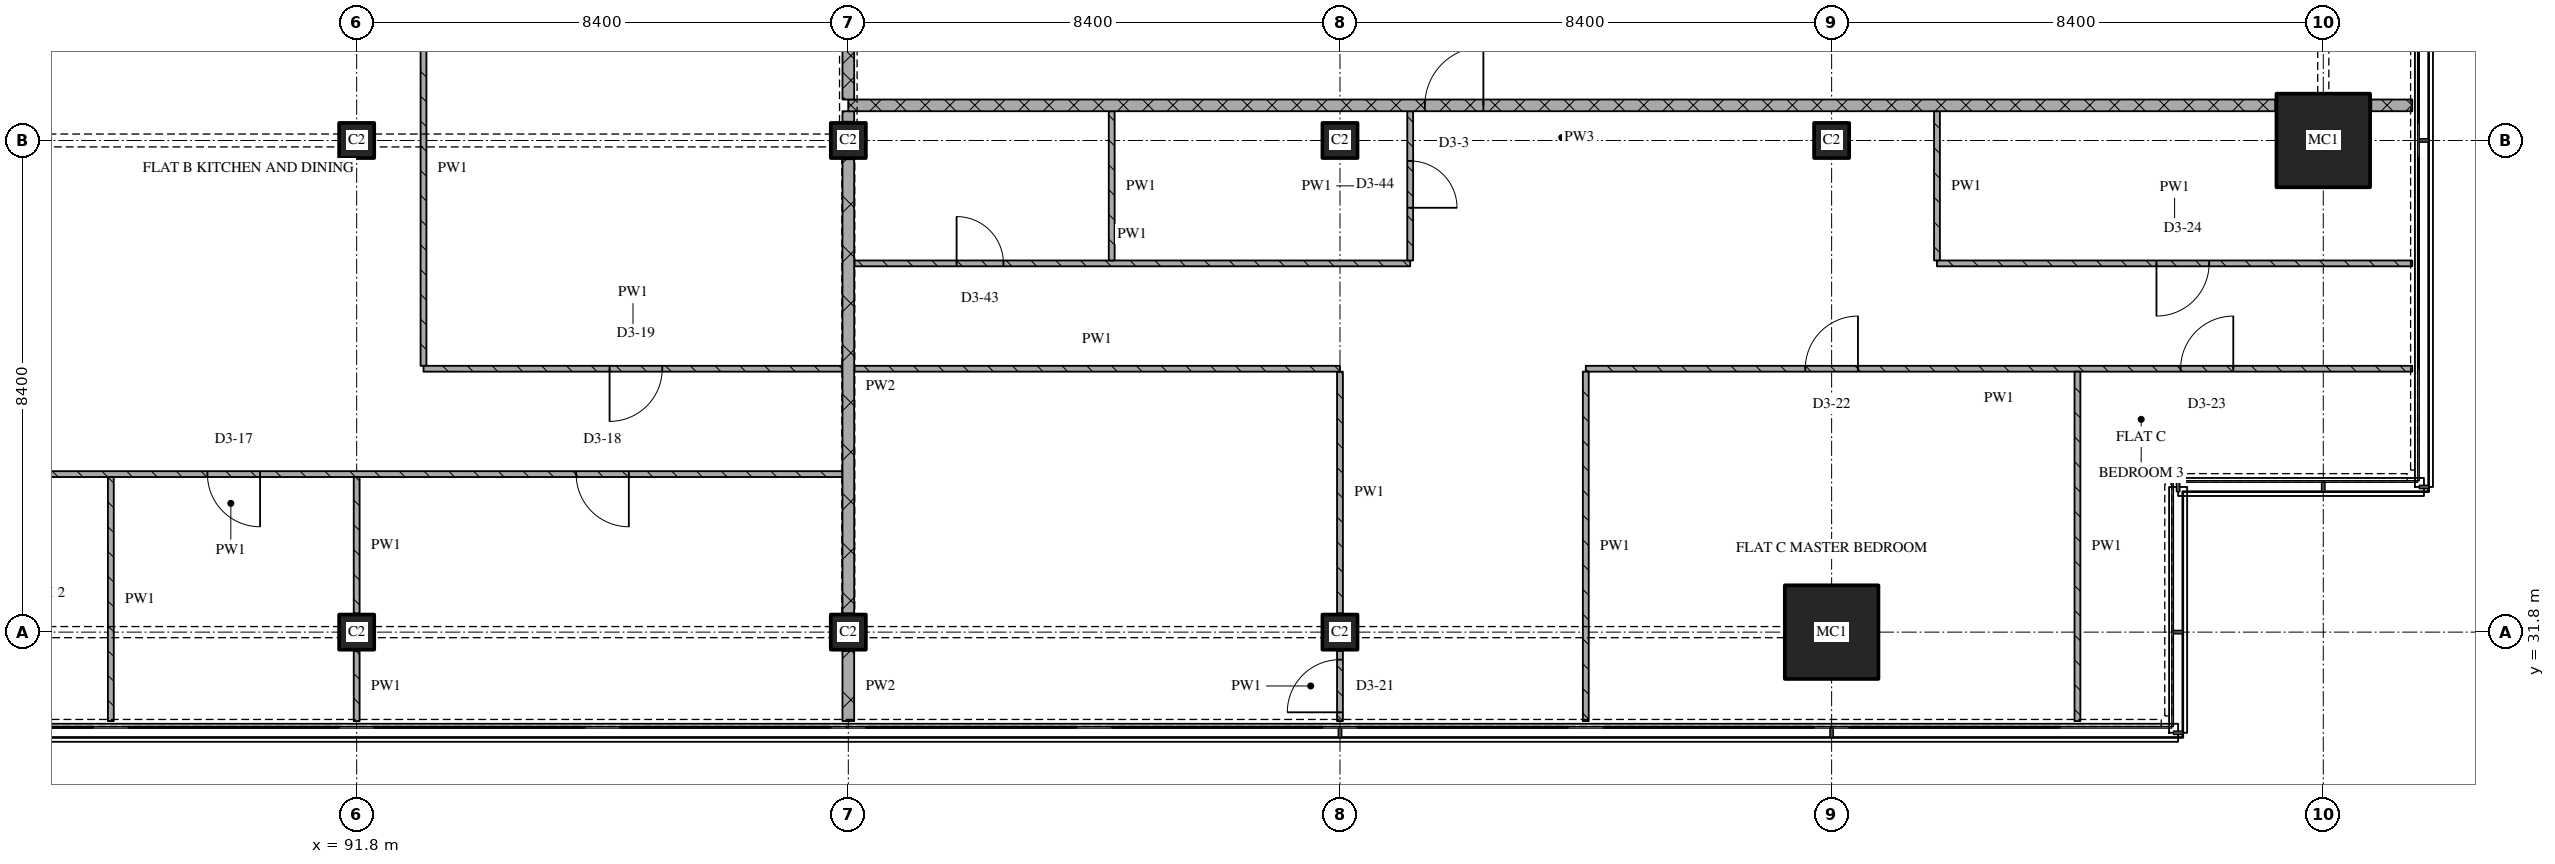
"""IFC4 building model, lengths in metres.
Left out: names, types, materials, properties, quantities, classifications, styles, units other than length and angle.
Written with IfcOpenShell. Run it as: python <this file> out.ifc"""

import sys

from ifc_helpers import new_model, si_unit, direction, frame, frame_2d, origin, origin_2d, place, context, subcontext, project, spatial, rectangle, extrude, element, fill, save


model = new_model("IFC4")
c1 = context("Model", 3, precision=1e-05, world=origin(), true_north=direction((0.0, 1.0)))
c2 = subcontext(c1, "Body", "Model", "MODEL_VIEW")
j1 = project(units=[si_unit("LENGTHUNIT", "METRE"), si_unit("PLANEANGLEUNIT", "RADIAN")], contexts=[c1])
p1 = place(None, origin())
s1 = spatial("IfcSite", under=j1, at=p1, CompositionType="ELEMENT")
p2 = place(p1, origin())
s2 = spatial("IfcBuilding", under=s1, at=p2, CompositionType="ELEMENT")
p3 = place(p2, frame((0.0, 0.0, 234.3)))
s3 = spatial("IfcBuildingStorey", under=s2, at=p3, CompositionType="ELEMENT", Elevation=234.3)
for number, where, z_axis, x_axis in (
    (1, (91.8, 31.8, 0.0), (0.0, 0.0, 1.0), (1.0, 0.0, 0.0)),
    (2, (91.8, 40.2, 0.0), (0.0, 0.0, 1.0), (1.0, 0.0, 0.0)),
    (3, (100.2, 31.8, 0.0), (0.0, 0.0, 1.0), (1.0, 0.0, 0.0)),
    (4, (100.2, 40.2, 0.0), (0.0, 0.0, 1.0), (1.0, 0.0, 0.0)),
    (5, (108.6, 31.8, 0.0), (0.0, 0.0, 1.0), (1.0, 0.0, 0.0)),
    (6, (108.6, 40.2, 0.0), (0.0, 0.0, 1.0), (1.0, 0.0, 0.0)),
):
    element("IfcColumn", number, at=place(p3, frame(where, z_axis=z_axis, x_axis=x_axis)), inside=s3, PredefinedType="COLUMN", context=c2, shape_type="SweptSolid", body=[
        extrude(rectangle(XDim=0.6, YDim=0.6, at=origin_2d()), origin(), (0.0, 0.0, 1.0), 3.6),
    ])
p4 = place(p3, frame((117.0, 31.8, 0.0), z_axis=(0.0, 0.0, 1.0), x_axis=(1.0, 0.0, 0.0)))
e7 = element("IfcColumn", 7, at=p4, inside=s3, PredefinedType="COLUMN", context=c2, shape_type="SweptSolid", body=[
    extrude(rectangle(XDim=1.6, YDim=1.6, at=origin_2d()), origin(), (0.0, 0.0, 1.0), 3.6),
])
p5 = place(p3, frame((117.0, 40.2, 0.0), z_axis=(0.0, 0.0, 1.0), x_axis=(1.0, 0.0, 0.0)))
e8 = element("IfcColumn", 8, at=p5, inside=s3, PredefinedType="COLUMN", context=c2, shape_type="SweptSolid", body=[
    extrude(rectangle(XDim=0.6, YDim=0.6, at=origin_2d()), origin(), (0.0, 0.0, 1.0), 3.6),
])
p6 = place(p3, frame((125.4, 40.2, 0.0), z_axis=(0.0, 0.0, 1.0), x_axis=(1.0, 0.0, 0.0)))
e9 = element("IfcColumn", 9, at=p6, inside=s3, PredefinedType="COLUMN", context=c2, shape_type="SweptSolid", body=[
    extrude(rectangle(XDim=1.6, YDim=1.6, at=origin_2d()), origin(), (0.0, 0.0, 1.0), 3.6),
])
p7 = place(p3, frame((100.1, 34.5, 0.0), z_axis=(0.0, 0.0, 1.0), x_axis=(-1.0, 0.0, 0.0)))
e10 = element("IfcWall", 10, at=p7, inside=s3, PredefinedType="PARTITIONING", context=c2, shape_type="SweptSolid", body=[
    extrude(rectangle(XDim=20.9, YDim=0.1, at=frame_2d((10.45, 0.0))), origin(), (0.0, 0.0, 1.0), 3.32),
])
p8 = place(p7, frame((3.65, 0.0, 0.0)))
e11 = element("IfcOpeningElement", 11, at=p8, cuts=e10, PredefinedType="OPENING", context=c2, shape_type="SweptSolid", body=[
    extrude(rectangle(XDim=0.9, YDim=2.1, at=frame_2d((0.45, 1.05))), frame((0.0, 0.06, 0.0), z_axis=(0.0, -1.0, 0.0), x_axis=(1.0, 0.0, 0.0)), (0.0, 0.0, 1.0), 0.12),
])
p9 = place(p7, frame((9.95, 0.0, 0.0)))
e12 = element("IfcOpeningElement", 12, at=p9, cuts=e10, PredefinedType="OPENING", context=c2, shape_type="SweptSolid", body=[
    extrude(rectangle(XDim=0.9, YDim=2.1, at=frame_2d((0.45, 1.05))), frame((0.0, 0.06, 0.0), z_axis=(0.0, -1.0, 0.0), x_axis=(1.0, 0.0, 0.0)), (0.0, 0.0, 1.0), 0.12),
])
p10 = place(p7, frame((14.15, 0.0, 0.0)))
e13 = element("IfcOpeningElement", 13, at=p10, cuts=e10, PredefinedType="OPENING", context=c2, shape_type="SweptSolid", body=[
    extrude(rectangle(XDim=0.9, YDim=2.1, at=frame_2d((0.45, 1.05))), frame((0.0, 0.06, 0.0), z_axis=(0.0, -1.0, 0.0), x_axis=(1.0, 0.0, 0.0)), (0.0, 0.0, 1.0), 0.12),
])
p11 = place(p7, frame((18.35, 0.0, 0.0)))
e14 = element("IfcOpeningElement", 14, at=p11, cuts=e10, PredefinedType="OPENING", context=c2, shape_type="SweptSolid", body=[
    extrude(rectangle(XDim=0.9, YDim=2.1, at=frame_2d((0.45, 1.05))), frame((0.0, 0.06, 0.0), z_axis=(0.0, -1.0, 0.0), x_axis=(1.0, 0.0, 0.0)), (0.0, 0.0, 1.0), 0.12),
])
p12 = place(p3, frame((126.92, 36.3, 0.0), z_axis=(0.0, 0.0, 1.0), x_axis=(-1.0, 0.0, 0.0)))
e15 = element("IfcWall", 15, at=p12, inside=s3, PredefinedType="PARTITIONING", context=c2, shape_type="SweptSolid", body=[
    extrude(rectangle(XDim=14.12, YDim=0.1, at=frame_2d((7.06, 0.0))), origin(), (0.0, 0.0, 1.0), 3.32),
])
p13 = place(p12, frame((3.058, 0.0, 0.0)))
e16 = element("IfcOpeningElement", 16, at=p13, cuts=e15, PredefinedType="OPENING", context=c2, shape_type="SweptSolid", body=[
    extrude(rectangle(XDim=0.9, YDim=2.1, at=frame_2d((0.45, 1.05))), frame((0.0, 0.06, 0.0), z_axis=(0.0, -1.0, 0.0), x_axis=(1.0, 0.0, 0.0)), (0.0, 0.0, 1.0), 0.12),
])
p14 = place(p12, frame((9.47, 0.0, 0.0)))
e17 = element("IfcOpeningElement", 17, at=p14, cuts=e15, PredefinedType="OPENING", context=c2, shape_type="SweptSolid", body=[
    extrude(rectangle(XDim=0.9, YDim=2.1, at=frame_2d((0.45, 1.05))), frame((0.0, 0.06, 0.0), z_axis=(0.0, -1.0, 0.0), x_axis=(1.0, 0.0, 0.0)), (0.0, 0.0, 1.0), 0.12),
])
p15 = place(p3, frame((100.3, 38.1, 0.0), z_axis=(0.0, 0.0, 1.0), x_axis=(1.0, 0.0, 0.0)))
e18 = element("IfcWall", 18, at=p15, inside=s3, PredefinedType="PARTITIONING", context=c2, shape_type="SweptSolid", body=[
    extrude(rectangle(XDim=9.5, YDim=0.1, at=frame_2d((4.75, 0.0))), origin(), (0.0, 0.0, 1.0), 3.32),
])
p16 = place(p15, frame((1.75, 0.0, 0.0)))
e19 = element("IfcOpeningElement", 19, at=p16, cuts=e18, PredefinedType="OPENING", context=c2, shape_type="SweptSolid", body=[
    extrude(rectangle(XDim=0.8, YDim=2.1, at=frame_2d((0.4, 1.05))), frame((0.0, 0.06, 0.0), z_axis=(0.0, -1.0, 0.0), x_axis=(1.0, 0.0, 0.0)), (0.0, 0.0, 1.0), 0.12),
])
p17 = place(p3, frame((118.8, 38.1, 0.0), z_axis=(0.0, 0.0, 1.0), x_axis=(1.0, 0.0, 0.0)))
e20 = element("IfcWall", 20, at=p17, inside=s3, PredefinedType="PARTITIONING", context=c2, shape_type="SweptSolid", body=[
    extrude(rectangle(XDim=8.12, YDim=0.1, at=frame_2d((4.06, 0.0))), origin(), (0.0, 0.0, 1.0), 3.32),
])
p18 = place(p17, frame((3.75, 0.0, 0.0)))
e21 = element("IfcOpeningElement", 21, at=p18, cuts=e20, PredefinedType="OPENING", context=c2, shape_type="SweptSolid", body=[
    extrude(rectangle(XDim=0.9, YDim=2.1, at=frame_2d((0.45, 1.05))), frame((0.0, 0.06, 0.0), z_axis=(0.0, -1.0, 0.0), x_axis=(1.0, 0.0, 0.0)), (0.0, 0.0, 1.0), 0.12),
])
p19 = place(p3, frame((124.58, 40.8, 0.0), z_axis=(0.0, 0.0, 1.0), x_axis=(-1.0, 0.0, 0.0)))
e22 = element("IfcWall", 22, at=p19, inside=s3, PredefinedType="PARTITIONING", context=c2, shape_type="SweptSolid", body=[
    extrude(rectangle(XDim=24.38, YDim=0.2, at=frame_2d((12.19, 0.0))), origin(), (0.0, 0.0, 1.0), 3.32),
])
p20 = place(p19, frame((13.53, 0.0, 0.0)))
e23 = element("IfcOpeningElement", 23, at=p20, cuts=e22, PredefinedType="OPENING", context=c2, shape_type="SweptSolid", body=[
    extrude(rectangle(XDim=1.0, YDim=2.1, at=frame_2d((0.5, 1.05))), frame((0.0, 0.11, 0.0), z_axis=(0.0, -1.0, 0.0), x_axis=(1.0, 0.0, 0.0)), (0.0, 0.0, 1.0), 0.22),
])
p21 = place(p3, frame((126.22, 40.8, 0.0), z_axis=(0.0, 0.0, 1.0), x_axis=(1.0, 0.0, 0.0)))
e24 = element("IfcWall", 24, at=p21, inside=s3, PredefinedType="PARTITIONING", context=c2, shape_type="SweptSolid", body=[
    extrude(rectangle(XDim=0.7, YDim=0.2, at=frame_2d((0.35, 0.0))), origin(), (0.0, 0.0, 1.0), 3.32),
])
p22 = place(p3, frame((87.6, 34.45, 0.0), z_axis=(0.0, 0.0, 1.0), x_axis=(0.0, -1.0, 0.0)))
e25 = element("IfcWall", 25, at=p22, inside=s3, PredefinedType="PARTITIONING", context=c2, shape_type="SweptSolid", body=[
    extrude(rectangle(XDim=4.17, YDim=0.1, at=frame_2d((2.085, 0.0))), origin(), (0.0, 0.0, 1.0), 3.32),
])
p23 = place(p3, frame((91.8, 31.48, 0.0), z_axis=(0.0, 0.0, 1.0), x_axis=(0.0, -1.0, 0.0)))
e26 = element("IfcWall", 26, at=p23, inside=s3, PredefinedType="PARTITIONING", context=c2, shape_type="SweptSolid", body=[
    extrude(rectangle(XDim=1.2, YDim=0.1, at=frame_2d((0.6, 0.0))), origin(), (0.0, 0.0, 1.0), 3.32),
])
p24 = place(p3, frame((91.8, 34.45, 0.0), z_axis=(0.0, 0.0, 1.0), x_axis=(0.0, -1.0, 0.0)))
e27 = element("IfcWall", 27, at=p24, inside=s3, PredefinedType="PARTITIONING", context=c2, shape_type="SweptSolid", body=[
    extrude(rectangle(XDim=2.33, YDim=0.1, at=frame_2d((1.165, 0.0))), origin(), (0.0, 0.0, 1.0), 3.32),
])
p25 = place(p3, frame((92.942, 43.1, 0.0), z_axis=(0.0, 0.0, 1.0), x_axis=(0.0, -1.0, 0.0)))
e28 = element("IfcWall", 28, at=p25, inside=s3, PredefinedType="PARTITIONING", context=c2, shape_type="SweptSolid", body=[
    extrude(rectangle(XDim=6.75, YDim=0.1, at=frame_2d((3.375, 0.0))), origin(), (0.0, 0.0, 1.0), 3.32),
])
p26 = place(p3, frame((100.2, 43.1, 0.0), z_axis=(0.0, 0.0, 1.0), x_axis=(0.0, -1.0, 0.0)))
e29 = element("IfcWall", 29, at=p26, inside=s3, PredefinedType="PARTITIONING", context=c2, shape_type="SweptSolid", body=[
    extrude(rectangle(XDim=2.2, YDim=0.2, at=frame_2d((1.1, 0.0))), origin(), (0.0, 0.0, 1.0), 2.53),
])
p27 = place(p3, frame((100.2, 31.48, 0.0), z_axis=(0.0, 0.0, 1.0), x_axis=(0.0, -1.0, 0.0)))
e30 = element("IfcWall", 30, at=p27, inside=s3, PredefinedType="PARTITIONING", context=c2, shape_type="SweptSolid", body=[
    extrude(rectangle(XDim=1.2, YDim=0.2, at=frame_2d((0.6, 0.0))), origin(), (0.0, 0.0, 1.0), 3.32),
])
p28 = place(p3, frame((100.2, 39.88, 0.0), z_axis=(0.0, 0.0, 1.0), x_axis=(0.0, -1.0, 0.0)))
e31 = element("IfcWall", 31, at=p28, inside=s3, PredefinedType="PARTITIONING", context=c2, shape_type="SweptSolid", body=[
    extrude(rectangle(XDim=7.76, YDim=0.2, at=frame_2d((3.88, 0.0))), origin(), (0.0, 0.0, 1.0), 2.72),
])
p29 = place(p3, frame((100.2, 40.7, 0.0), z_axis=(0.0, 0.0, 1.0), x_axis=(0.0, -1.0, 0.0)))
e32 = element("IfcWall", 32, at=p29, inside=s3, PredefinedType="PARTITIONING", context=c2, shape_type="SweptSolid", body=[
    extrude(rectangle(XDim=0.18, YDim=0.2, at=frame_2d((0.09, 0.0))), origin(), (0.0, 0.0, 1.0), 3.32),
])
p30 = place(p3, frame((104.7, 40.7, 0.0), z_axis=(0.0, 0.0, 1.0), x_axis=(0.0, -1.0, 0.0)))
e33 = element("IfcWall", 33, at=p30, inside=s3, PredefinedType="PARTITIONING", context=c2, shape_type="SweptSolid", body=[
    extrude(rectangle(XDim=2.55, YDim=0.1, at=frame_2d((1.275, 0.0))), origin(), (0.0, 0.0, 1.0), 3.32),
])
p31 = place(p3, frame((108.6, 30.28, 0.0), z_axis=(0.0, 0.0, 1.0), x_axis=(0.0, 1.0, 0.0)))
e34 = element("IfcWall", 34, at=p31, inside=s3, PredefinedType="PARTITIONING", context=c2, shape_type="SweptSolid", body=[
    extrude(rectangle(XDim=1.2, YDim=0.1, at=frame_2d((0.6, 0.0))), origin(), (0.0, 0.0, 1.0), 3.32),
])
p32 = place(p31, frame((0.15, 0.0, 0.0)))
e35 = element("IfcOpeningElement", 35, at=p32, cuts=e34, PredefinedType="OPENING", context=c2, shape_type="SweptSolid", body=[
    extrude(rectangle(XDim=0.9, YDim=2.1, at=frame_2d((0.45, 1.05))), frame((0.0, 0.06, 0.0), z_axis=(0.0, -1.0, 0.0), x_axis=(1.0, 0.0, 0.0)), (0.0, 0.0, 1.0), 0.12),
])
p33 = place(p3, frame((108.6, 36.25, 0.0), z_axis=(0.0, 0.0, 1.0), x_axis=(0.0, -1.0, 0.0)))
e36 = element("IfcWall", 36, at=p33, inside=s3, PredefinedType="PARTITIONING", context=c2, shape_type="SweptSolid", body=[
    extrude(rectangle(XDim=4.13, YDim=0.1, at=frame_2d((2.065, 0.0))), origin(), (0.0, 0.0, 1.0), 3.32),
])
p34 = place(p3, frame((109.8, 38.15, 0.0), z_axis=(0.0, 0.0, 1.0), x_axis=(0.0, 1.0, 0.0)))
e37 = element("IfcWall", 37, at=p34, inside=s3, PredefinedType="PARTITIONING", context=c2, shape_type="SweptSolid", body=[
    extrude(rectangle(XDim=2.55, YDim=0.1, at=frame_2d((1.275, 0.0))), origin(), (0.0, 0.0, 1.0), 3.32),
])
p35 = place(p34, frame((0.9, 0.0, 0.0)))
e38 = element("IfcOpeningElement", 38, at=p35, cuts=e37, PredefinedType="OPENING", context=c2, shape_type="SweptSolid", body=[
    extrude(rectangle(XDim=0.8, YDim=2.1, at=frame_2d((0.4, 1.05))), frame((0.0, 0.06, 0.0), z_axis=(0.0, -1.0, 0.0), x_axis=(1.0, 0.0, 0.0)), (0.0, 0.0, 1.0), 0.12),
])
p36 = place(p3, frame((112.8, 36.25, 0.0), z_axis=(0.0, 0.0, 1.0), x_axis=(0.0, -1.0, 0.0)))
e39 = element("IfcWall", 39, at=p36, inside=s3, PredefinedType="PARTITIONING", context=c2, shape_type="SweptSolid", body=[
    extrude(rectangle(XDim=5.97, YDim=0.1, at=frame_2d((2.985, 0.0))), origin(), (0.0, 0.0, 1.0), 3.32),
])
p37 = place(p3, frame((118.8, 40.7, 0.0), z_axis=(0.0, 0.0, 1.0), x_axis=(0.0, -1.0, 0.0)))
e40 = element("IfcWall", 40, at=p37, inside=s3, PredefinedType="PARTITIONING", context=c2, shape_type="SweptSolid", body=[
    extrude(rectangle(XDim=2.55, YDim=0.1, at=frame_2d((1.275, 0.0))), origin(), (0.0, 0.0, 1.0), 3.32),
])
p38 = place(p3, frame((121.2, 36.25, 0.0), z_axis=(0.0, 0.0, 1.0), x_axis=(0.0, -1.0, 0.0)))
e41 = element("IfcWall", 41, at=p38, inside=s3, PredefinedType="PARTITIONING", context=c2, shape_type="SweptSolid", body=[
    extrude(rectangle(XDim=5.97, YDim=0.1, at=frame_2d((2.985, 0.0))), origin(), (0.0, 0.0, 1.0), 3.32),
])
p39 = place(p3, frame((92.942, 36.3, 0.0), z_axis=(0.0, 0.0, 1.0), x_axis=(1.0, 0.0, 0.0)))
e42 = element("IfcWall", 42, at=p39, inside=s3, PredefinedType="PARTITIONING", context=c2, shape_type="SweptSolid", body=[
    extrude(rectangle(XDim=7.158, YDim=0.1, at=frame_2d((3.579, 0.0))), origin(), (0.0, 0.0, 1.0), 3.32),
])
p40 = place(p39, frame((3.179, 0.0, 0.0)))
e43 = element("IfcOpeningElement", 43, at=p40, cuts=e42, PredefinedType="OPENING", context=c2, shape_type="SweptSolid", body=[
    extrude(rectangle(XDim=0.9, YDim=2.1, at=frame_2d((0.45, 1.05))), frame((0.0, 0.06, 0.0), z_axis=(0.0, -1.0, 0.0), x_axis=(1.0, 0.0, 0.0)), (0.0, 0.0, 1.0), 0.12),
])
p41 = place(p3, frame((100.3, 36.3, 0.0), z_axis=(0.0, 0.0, 1.0), x_axis=(1.0, 0.0, 0.0)))
e44 = element("IfcWall", 44, at=p41, inside=s3, PredefinedType="PARTITIONING", context=c2, shape_type="SweptSolid", body=[
    extrude(rectangle(XDim=8.3, YDim=0.1, at=frame_2d((4.15, 0.0))), origin(), (0.0, 0.0, 1.0), 3.32),
])
p42 = place(p8, origin())
e45 = element("IfcDoor", 45, at=p42, inside=s3, OperationType="SINGLE_SWING_LEFT", PredefinedType="DOOR", context=c2, shape_type="SweptSolid", body=[
    extrude(rectangle(XDim=0.9, YDim=2.1, at=frame_2d((0.45, 1.05))), frame((0.0, 0.025, 0.0), z_axis=(0.0, -1.0, 0.0), x_axis=(1.0, 0.0, 0.0)), (0.0, 0.0, 1.0), 0.05),
])
fill(e11, e45)
p43 = place(p9, origin())
e46 = element("IfcDoor", 46, at=p43, inside=s3, OperationType="SINGLE_SWING_LEFT", PredefinedType="DOOR", context=c2, shape_type="SweptSolid", body=[
    extrude(rectangle(XDim=0.9, YDim=2.1, at=frame_2d((0.45, 1.05))), frame((0.0, 0.025, 0.0), z_axis=(0.0, -1.0, 0.0), x_axis=(1.0, 0.0, 0.0)), (0.0, 0.0, 1.0), 0.05),
])
fill(e12, e46)
p44 = place(p13, origin())
e47 = element("IfcDoor", 47, at=p44, inside=s3, OperationType="SINGLE_SWING_RIGHT", PredefinedType="DOOR", context=c2, shape_type="SweptSolid", body=[
    extrude(rectangle(XDim=0.9, YDim=2.1, at=frame_2d((0.45, 1.05))), frame((0.0, 0.025, 0.0), z_axis=(0.0, -1.0, 0.0), x_axis=(1.0, 0.0, 0.0)), (0.0, 0.0, 1.0), 0.05),
])
fill(e16, e47)
p45 = place(p14, origin())
e48 = element("IfcDoor", 48, at=p45, inside=s3, OperationType="SINGLE_SWING_RIGHT", PredefinedType="DOOR", context=c2, shape_type="SweptSolid", body=[
    extrude(rectangle(XDim=0.9, YDim=2.1, at=frame_2d((0.45, 1.05))), frame((0.0, 0.025, 0.0), z_axis=(0.0, -1.0, 0.0), x_axis=(1.0, 0.0, 0.0)), (0.0, 0.0, 1.0), 0.05),
])
fill(e17, e48)
p46 = place(p16, origin())
e49 = element("IfcDoor", 49, at=p46, inside=s3, OperationType="SINGLE_SWING_LEFT", PredefinedType="DOOR", context=c2, shape_type="SweptSolid", body=[
    extrude(rectangle(XDim=0.8, YDim=2.1, at=frame_2d((0.4, 1.05))), frame((0.0, 0.025, 0.0), z_axis=(0.0, -1.0, 0.0), x_axis=(1.0, 0.0, 0.0)), (0.0, 0.0, 1.0), 0.05),
])
fill(e19, e49)
p47 = place(p18, origin())
e50 = element("IfcDoor", 50, at=p47, inside=s3, OperationType="SINGLE_SWING_RIGHT", PredefinedType="DOOR", context=c2, shape_type="SweptSolid", body=[
    extrude(rectangle(XDim=0.9, YDim=2.1, at=frame_2d((0.45, 1.05))), frame((0.0, 0.025, 0.0), z_axis=(0.0, -1.0, 0.0), x_axis=(1.0, 0.0, 0.0)), (0.0, 0.0, 1.0), 0.05),
])
fill(e21, e50)
p48 = place(p20, origin())
e51 = element("IfcDoor", 51, at=p48, inside=s3, OperationType="SINGLE_SWING_RIGHT", PredefinedType="DOOR", context=c2, shape_type="SweptSolid", body=[
    extrude(rectangle(XDim=1.0, YDim=2.1, at=frame_2d((0.5, 1.05))), frame((0.0, 0.025, 0.0), z_axis=(0.0, -1.0, 0.0), x_axis=(1.0, 0.0, 0.0)), (0.0, 0.0, 1.0), 0.05),
])
fill(e23, e51)
p49 = place(p32, origin())
e52 = element("IfcDoor", 52, at=p49, inside=s3, OperationType="SINGLE_SWING_LEFT", PredefinedType="DOOR", context=c2, shape_type="SweptSolid", body=[
    extrude(rectangle(XDim=0.9, YDim=2.1, at=frame_2d((0.45, 1.05))), frame((0.0, 0.025, 0.0), z_axis=(0.0, -1.0, 0.0), x_axis=(1.0, 0.0, 0.0)), (0.0, 0.0, 1.0), 0.05),
])
fill(e35, e52)
p50 = place(p35, origin())
e53 = element("IfcDoor", 53, at=p50, inside=s3, OperationType="SINGLE_SWING_RIGHT", PredefinedType="DOOR", context=c2, shape_type="SweptSolid", body=[
    extrude(rectangle(XDim=0.8, YDim=2.1, at=frame_2d((0.4, 1.05))), frame((0.0, 0.025, 0.0), z_axis=(0.0, -1.0, 0.0), x_axis=(1.0, 0.0, 0.0)), (0.0, 0.0, 1.0), 0.05),
])
fill(e38, e53)
p51 = place(p40, origin())
e54 = element("IfcDoor", 54, at=p51, inside=s3, OperationType="SINGLE_SWING_RIGHT", PredefinedType="DOOR", context=c2, shape_type="SweptSolid", body=[
    extrude(rectangle(XDim=0.9, YDim=2.1, at=frame_2d((0.45, 1.05))), frame((0.0, 0.025, 0.0), z_axis=(0.0, -1.0, 0.0), x_axis=(1.0, 0.0, 0.0)), (0.0, 0.0, 1.0), 0.05),
])
fill(e43, e54)
save(model, sys.argv[1])
